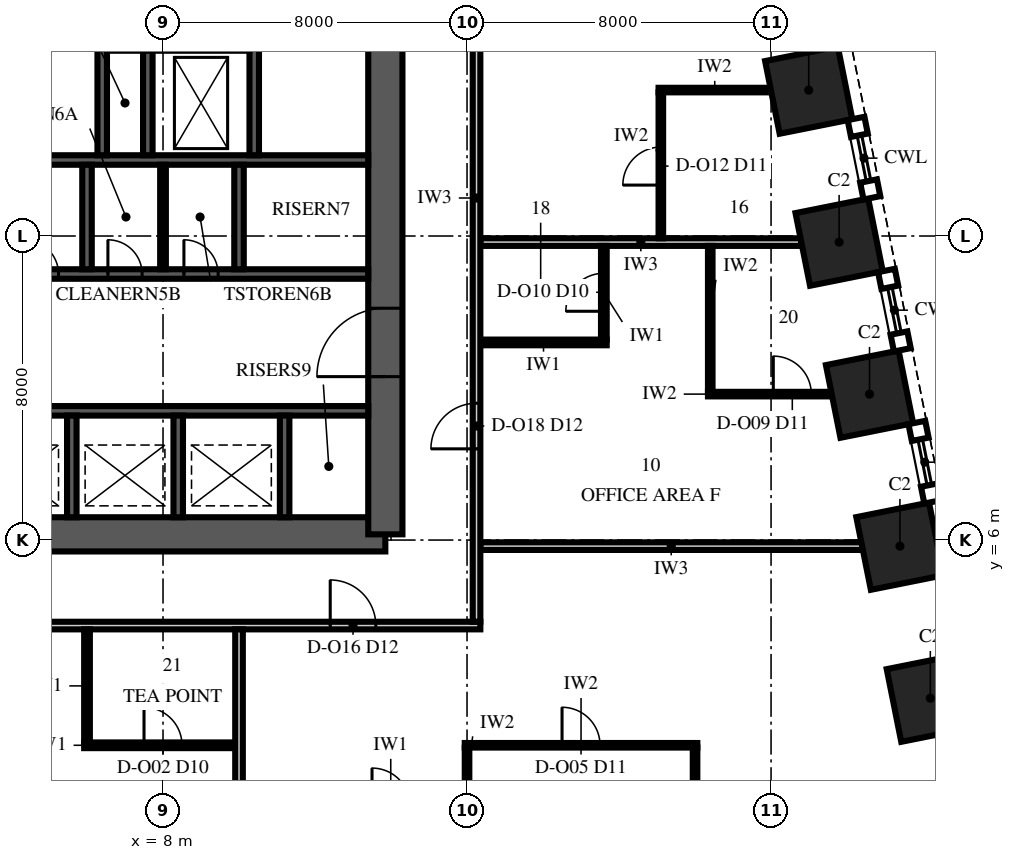
"""IFC4 building model, lengths in metres.
Left out: names, types, materials, properties, quantities, classifications, styles, units other than length and angle.
Written with IfcOpenShell. Run it as: python <this file> out.ifc"""

import sys

from ifc_helpers import new_model, si_unit, direction, frame, frame_2d, origin, origin_2d, place, context, subcontext, project, spatial, polyline, rectangle, outline, extrude, element, fill, save


model = new_model("IFC4")
c1 = context("Model", 3, precision=1e-05, world=origin(), true_north=direction((0.0, 1.0)))
c2 = subcontext(c1, "Body", "Model", "MODEL_VIEW")
j1 = project(units=[si_unit("LENGTHUNIT", "METRE"), si_unit("PLANEANGLEUNIT", "RADIAN")], contexts=[c1])
p1 = place(None, origin())
s1 = spatial("IfcSite", under=j1, at=p1, CompositionType="ELEMENT")
p2 = place(p1, origin())
s2 = spatial("IfcBuilding", under=s1, at=p2, CompositionType="ELEMENT")
p3 = place(p2, frame((0.0, 0.0, 36.0)))
s3 = spatial("IfcBuildingStorey", under=s2, at=p3, CompositionType="ELEMENT", Elevation=36.0)
for number, where, z_axis, x_axis in (
    (1, (28.191, 1.838, 0.0), (0.0, 0.0, 1.0), (-0.196, 0.981, 0.0)),
    (2, (27.391, 5.838, 0.0), (0.0, 0.0, 1.0), (-0.196, 0.981, 0.0)),
    (3, (26.591, 9.838, 0.0), (0.0, 0.0, 1.0), (-0.196, 0.981, 0.0)),
    (4, (25.791, 13.838, 0.0), (0.0, 0.0, 1.0), (-0.196, 0.981, 0.0)),
    (5, (24.991, 17.838, 0.0), (0.0, 0.0, 1.0), (-0.196, 0.981, 0.0)),
):
    element("IfcColumn", number, at=place(p3, frame(where, z_axis=z_axis, x_axis=x_axis)), inside=s3, PredefinedType="COLUMN", context=c2, shape_type="SweptSolid", body=[
        extrude(rectangle(XDim=1.95, YDim=1.95, at=origin_2d()), origin(), (0.0, 0.0, 1.0), 4.0),
    ])
p4 = place(p3, frame((-13.85, 6.15, 0.0), z_axis=(0.0, 0.0, 1.0), x_axis=(1.0, 0.0, 0.0)))
e6 = element("IfcWall", 6, at=p4, inside=s3, PredefinedType="SHEAR", context=c2, shape_type="SweptSolid", body=[
    extrude(rectangle(XDim=27.7, YDim=0.9, at=frame_2d((13.85, 0.0))), origin(), (0.0, 0.0, 1.0), 4.0),
])
p5 = place(p3, frame((13.85, 6.15, 0.0), z_axis=(0.0, 0.0, 1.0), x_axis=(0.0, 1.0, 0.0)))
e7 = element("IfcWall", 7, at=p5, inside=s3, PredefinedType="SHEAR", context=c2, shape_type="SweptSolid", body=[
    extrude(outline(polyline([(0.0, -0.45), (17.7, -0.45), (17.7, 0.0), (17.25, 0.0), (17.25, 0.45), (0.45, 0.45), (0.45, 0.0), (0.0, 0.0), (0.0, -0.45)])), origin(), (0.0, 0.0, 1.0), 4.0),
])
p6 = place(p5, frame((4.15, 0.0, 0.0)))
e8 = element("IfcOpeningElement", 8, at=p6, cuts=e7, PredefinedType="OPENING", context=c2, shape_type="SweptSolid", body=[
    extrude(rectangle(XDim=1.8, YDim=2.4, at=frame_2d((0.9, 1.2))), frame((0.0, 0.465, 0.0), z_axis=(0.0, -1.0, 0.0), x_axis=(1.0, 0.0, 0.0)), (0.0, 0.0, 1.0), 0.93),
])
p7 = place(p3, frame((-13.4, 9.4, 0.0), z_axis=(0.0, 0.0, 1.0), x_axis=(1.0, 0.0, 0.0)))
e9 = element("IfcWall", 9, at=p7, inside=s3, PredefinedType="SHEAR", context=c2, shape_type="SweptSolid", body=[
    extrude(rectangle(XDim=26.8, YDim=0.25, at=frame_2d((13.4, 0.0))), origin(), (0.0, 0.0, 1.0), 4.0),
])
p8 = place(p7, frame((0.25, 0.0, 0.0)))
e10 = element("IfcOpeningElement", 10, at=p8, cuts=e9, PredefinedType="OPENING", context=c2, shape_type="SweptSolid", body=[
    extrude(rectangle(XDim=1.1, YDim=2.1, at=frame_2d((0.55, 1.05))), frame((0.0, 0.14, 0.0), z_axis=(0.0, -1.0, 0.0), x_axis=(1.0, 0.0, 0.0)), (0.0, 0.0, 1.0), 0.28),
])
p9 = place(p7, frame((3.05, 0.0, 0.0)))
e11 = element("IfcOpeningElement", 11, at=p9, cuts=e9, PredefinedType="OPENING", context=c2, shape_type="SweptSolid", body=[
    extrude(rectangle(XDim=1.1, YDim=2.1, at=frame_2d((0.55, 1.05))), frame((0.0, 0.14, 0.0), z_axis=(0.0, -1.0, 0.0), x_axis=(1.0, 0.0, 0.0)), (0.0, 0.0, 1.0), 0.28),
])
p10 = place(p7, frame((5.85, 0.0, 0.0)))
e12 = element("IfcOpeningElement", 12, at=p10, cuts=e9, PredefinedType="OPENING", context=c2, shape_type="SweptSolid", body=[
    extrude(rectangle(XDim=1.1, YDim=2.1, at=frame_2d((0.55, 1.05))), frame((0.0, 0.14, 0.0), z_axis=(0.0, -1.0, 0.0), x_axis=(1.0, 0.0, 0.0)), (0.0, 0.0, 1.0), 0.28),
])
p11 = place(p3, frame((-13.4, 13.0, 0.0), z_axis=(0.0, 0.0, 1.0), x_axis=(1.0, 0.0, 0.0)))
e13 = element("IfcWall", 13, at=p11, inside=s3, PredefinedType="SHEAR", context=c2, shape_type="SweptSolid", body=[
    extrude(rectangle(XDim=26.8, YDim=0.25, at=frame_2d((13.4, 0.0))), origin(), (0.0, 0.0, 1.0), 4.0),
])
p12 = place(p11, frame((0.25, 0.0, 0.0)))
e14 = element("IfcOpeningElement", 14, at=p12, cuts=e13, PredefinedType="OPENING", context=c2, shape_type="SweptSolid", body=[
    extrude(rectangle(XDim=1.1, YDim=2.1, at=frame_2d((0.55, 1.05))), frame((0.0, 0.14, 0.0), z_axis=(0.0, -1.0, 0.0), x_axis=(1.0, 0.0, 0.0)), (0.0, 0.0, 1.0), 0.28),
])
p13 = place(p11, frame((8.65, 0.0, 0.0)))
e15 = element("IfcOpeningElement", 15, at=p13, cuts=e13, PredefinedType="OPENING", context=c2, shape_type="SweptSolid", body=[
    extrude(rectangle(XDim=1.1, YDim=2.1, at=frame_2d((0.55, 1.05))), frame((0.0, 0.14, 0.0), z_axis=(0.0, -1.0, 0.0), x_axis=(1.0, 0.0, 0.0)), (0.0, 0.0, 1.0), 0.28),
])
p14 = place(p11, frame((12.05, 0.0, 0.0)))
e16 = element("IfcOpeningElement", 16, at=p14, cuts=e13, PredefinedType="OPENING", context=c2, shape_type="SweptSolid", body=[
    extrude(rectangle(XDim=1.1, YDim=2.1, at=frame_2d((0.55, 1.05))), frame((0.0, 0.14, 0.0), z_axis=(0.0, -1.0, 0.0), x_axis=(1.0, 0.0, 0.0)), (0.0, 0.0, 1.0), 0.28),
])
p15 = place(p11, frame((15.35, 0.0, 0.0)))
e17 = element("IfcOpeningElement", 17, at=p15, cuts=e13, PredefinedType="OPENING", context=c2, shape_type="SweptSolid", body=[
    extrude(rectangle(XDim=0.9, YDim=2.1, at=frame_2d((0.45, 1.05))), frame((0.0, 0.14, 0.0), z_axis=(0.0, -1.0, 0.0), x_axis=(1.0, 0.0, 0.0)), (0.0, 0.0, 1.0), 0.28),
])
p16 = place(p11, frame((17.75, 0.0, 0.0)))
e18 = element("IfcOpeningElement", 18, at=p16, cuts=e13, PredefinedType="OPENING", context=c2, shape_type="SweptSolid", body=[
    extrude(rectangle(XDim=0.9, YDim=2.1, at=frame_2d((0.45, 1.05))), frame((0.0, 0.14, 0.0), z_axis=(0.0, -1.0, 0.0), x_axis=(1.0, 0.0, 0.0)), (0.0, 0.0, 1.0), 0.28),
])
p17 = place(p11, frame((19.95, 0.0, 0.0)))
e19 = element("IfcOpeningElement", 19, at=p17, cuts=e13, PredefinedType="OPENING", context=c2, shape_type="SweptSolid", body=[
    extrude(rectangle(XDim=0.9, YDim=2.1, at=frame_2d((0.45, 1.05))), frame((0.0, 0.14, 0.0), z_axis=(0.0, -1.0, 0.0), x_axis=(1.0, 0.0, 0.0)), (0.0, 0.0, 1.0), 0.28),
])
p18 = place(p11, frame((21.95, 0.0, 0.0)))
e20 = element("IfcOpeningElement", 20, at=p18, cuts=e13, PredefinedType="OPENING", context=c2, shape_type="SweptSolid", body=[
    extrude(rectangle(XDim=0.9, YDim=2.1, at=frame_2d((0.45, 1.05))), frame((0.0, 0.14, 0.0), z_axis=(0.0, -1.0, 0.0), x_axis=(1.0, 0.0, 0.0)), (0.0, 0.0, 1.0), 0.28),
])
p19 = place(p3, frame((-13.4, 16.0, 0.0), z_axis=(0.0, 0.0, 1.0), x_axis=(1.0, 0.0, 0.0)))
e21 = element("IfcWall", 21, at=p19, inside=s3, PredefinedType="SHEAR", context=c2, shape_type="SweptSolid", body=[
    extrude(rectangle(XDim=26.8, YDim=0.25, at=frame_2d((13.4, 0.0))), origin(), (0.0, 0.0, 1.0), 4.0),
])
for number, where, z_axis, x_axis in (
    (22, (5.6, 6.6, 0.0), (0.0, 0.0, 1.0), (0.0, 1.0, 0.0)),
    (23, (8.4, 6.6, 0.0), (0.0, 0.0, 1.0), (0.0, 1.0, 0.0)),
    (24, (11.2, 6.6, 0.0), (0.0, 0.0, 1.0), (0.0, 1.0, 0.0)),
):
    element("IfcWall", number, at=place(p3, frame(where, z_axis=z_axis, x_axis=x_axis)), inside=s3, PredefinedType="SHEAR", context=c2, shape_type="SweptSolid", body=[
        extrude(rectangle(XDim=2.675, YDim=0.25, at=frame_2d((1.337, 0.0))), origin(), (0.0, 0.0, 1.0), 4.0),
    ])
for number, where, z_axis, x_axis in (
    (25, (6.0, 13.125, 0.0), (0.0, 0.0, 1.0), (0.0, 1.0, 0.0)),
    (26, (10.0, 13.125, 0.0), (0.0, 0.0, 1.0), (0.0, 1.0, 0.0)),
):
    element("IfcWall", number, at=place(p3, frame(where, z_axis=z_axis, x_axis=x_axis)), inside=s3, PredefinedType="SHEAR", context=c2, shape_type="SweptSolid", body=[
        extrude(rectangle(XDim=2.75, YDim=0.25, at=frame_2d((1.375, 0.0))), origin(), (0.0, 0.0, 1.0), 4.0),
    ])
p20 = place(p3, frame((6.4, 16.125, 0.0), z_axis=(0.0, 0.0, 1.0), x_axis=(0.0, 1.0, 0.0)))
e27 = element("IfcWall", 27, at=p20, inside=s3, PredefinedType="SHEAR", context=c2, shape_type="SweptSolid", body=[
    extrude(rectangle(XDim=7.275, YDim=0.25, at=frame_2d((3.637, 0.0))), origin(), (0.0, 0.0, 1.0), 4.0),
])
p21 = place(p3, frame((10.4, 16.125, 0.0), z_axis=(0.0, 0.0, 1.0), x_axis=(0.0, 1.0, 0.0)))
e28 = element("IfcWall", 28, at=p21, inside=s3, PredefinedType="SHEAR", context=c2, shape_type="SweptSolid", body=[
    extrude(rectangle(XDim=7.275, YDim=0.25, at=frame_2d((3.637, 0.0))), origin(), (0.0, 0.0, 1.0), 4.0),
])
p22 = place(p21, frame((6.075, 0.0, 0.0)))
e29 = element("IfcOpeningElement", 29, at=p22, cuts=e28, PredefinedType="OPENING", context=c2, shape_type="SweptSolid", body=[
    extrude(rectangle(XDim=1.0, YDim=2.1, at=frame_2d((0.5, 1.05))), frame((0.0, 0.14, 0.0), z_axis=(0.0, -1.0, 0.0), x_axis=(1.0, 0.0, 0.0)), (0.0, 0.0, 1.0), 0.28),
])
p23 = place(p3, frame((7.6, 16.125, 0.0), z_axis=(0.0, 0.0, 1.0), x_axis=(0.0, 1.0, 0.0)))
e30 = element("IfcWall", 30, at=p23, inside=s3, PredefinedType="SHEAR", context=c2, shape_type="SweptSolid", body=[
    extrude(rectangle(XDim=2.75, YDim=0.25, at=frame_2d((1.375, 0.0))), origin(), (0.0, 0.0, 1.0), 4.0),
])
p24 = place(p3, frame((8.0, 13.125, 0.0), z_axis=(0.0, 0.0, 1.0), x_axis=(0.0, 1.0, 0.0)))
e31 = element("IfcWall", 31, at=p24, inside=s3, PredefinedType="PARTITIONING", context=c2, shape_type="SweptSolid", body=[
    extrude(rectangle(XDim=2.75, YDim=0.15, at=frame_2d((1.375, 0.0))), origin(), (0.0, 0.0, 1.0), 3.85),
])
p25 = place(p3, frame((5.925, 0.6, 0.0), z_axis=(0.0, 0.0, 1.0), x_axis=(1.0, 0.0, 0.0)))
e32 = element("IfcWall", 32, at=p25, inside=s3, PredefinedType="PARTITIONING", context=c2, shape_type="SweptSolid", body=[
    extrude(rectangle(XDim=3.975, YDim=0.15, at=frame_2d((1.987, 0.0))), origin(), (0.0, 0.0, 1.0), 3.85),
])
p26 = place(p25, frame((1.575, 0.0, 0.0)))
e33 = element("IfcOpeningElement", 33, at=p26, cuts=e32, PredefinedType="OPENING", context=c2, shape_type="SweptSolid", body=[
    extrude(rectangle(XDim=1.0, YDim=2.3, at=frame_2d((0.5, 1.15))), frame((0.0, 0.09, 0.0), z_axis=(0.0, -1.0, 0.0), x_axis=(1.0, 0.0, 0.0)), (0.0, 0.0, 1.0), 0.18),
])
p27 = place(p3, frame((15.94, 0.6, 0.0), z_axis=(0.0, 0.0, 1.0), x_axis=(1.0, 0.0, 0.0)))
e34 = element("IfcWall", 34, at=p27, inside=s3, PredefinedType="PARTITIONING", context=c2, shape_type="SweptSolid", body=[
    extrude(rectangle(XDim=6.12, YDim=0.12, at=frame_2d((3.06, 0.0))), origin(), (0.0, 0.0, 1.0), 3.25),
])
p28 = place(p27, frame((2.56, 0.0, 0.0)))
e35 = element("IfcOpeningElement", 35, at=p28, cuts=e34, PredefinedType="OPENING", context=c2, shape_type="SweptSolid", body=[
    extrude(rectangle(XDim=1.0, YDim=2.4, at=frame_2d((0.5, 1.2))), frame((0.0, 0.075, 0.0), z_axis=(0.0, -1.0, 0.0), x_axis=(1.0, 0.0, 0.0)), (0.0, 0.0, 1.0), 0.15),
])
p29 = place(p3, frame((-16.35, 3.75, 0.0), z_axis=(0.0, 0.0, 1.0), x_axis=(1.0, 0.0, 0.0)))
e36 = element("IfcWall", 36, at=p29, inside=s3, PredefinedType="PARTITIONING", context=c2, shape_type="SweptSolid", body=[
    extrude(rectangle(XDim=32.7, YDim=0.2, at=frame_2d((16.35, 0.0))), origin(), (0.0, 0.0, 1.0), 3.25),
])
p30 = place(p29, frame((15.75, 0.0, 0.0)))
e37 = element("IfcOpeningElement", 37, at=p30, cuts=e36, PredefinedType="OPENING", context=c2, shape_type="SweptSolid", body=[
    extrude(rectangle(XDim=1.2, YDim=2.4, at=frame_2d((0.6, 1.2))), frame((0.0, 0.115, 0.0), z_axis=(0.0, -1.0, 0.0), x_axis=(1.0, 0.0, 0.0)), (0.0, 0.0, 1.0), 0.23),
])
p31 = place(p29, frame((2.75, 0.0, 0.0)))
e38 = element("IfcOpeningElement", 38, at=p31, cuts=e36, PredefinedType="OPENING", context=c2, shape_type="SweptSolid", body=[
    extrude(rectangle(XDim=1.2, YDim=2.4, at=frame_2d((0.6, 1.2))), frame((0.0, 0.115, 0.0), z_axis=(0.0, -1.0, 0.0), x_axis=(1.0, 0.0, 0.0)), (0.0, 0.0, 1.0), 0.23),
])
p32 = place(p29, frame((28.75, 0.0, 0.0)))
e39 = element("IfcOpeningElement", 39, at=p32, cuts=e36, PredefinedType="OPENING", context=c2, shape_type="SweptSolid", body=[
    extrude(rectangle(XDim=1.2, YDim=2.4, at=frame_2d((0.6, 1.2))), frame((0.0, 0.115, 0.0), z_axis=(0.0, -1.0, 0.0), x_axis=(1.0, 0.0, 0.0)), (0.0, 0.0, 1.0), 0.23),
])
p33 = place(p3, frame((16.35, 5.84, 0.0), z_axis=(0.0, 0.0, 1.0), x_axis=(1.0, 0.0, 0.0)))
e40 = element("IfcWall", 40, at=p33, inside=s3, PredefinedType="PARTITIONING", context=c2, shape_type="SweptSolid", body=[
    extrude(rectangle(XDim=10.046, YDim=0.2, at=frame_2d((5.023, 0.0))), origin(), (0.0, 0.0, 1.0), 2.842),
])
p34 = place(p3, frame((22.34, 9.84, 0.0), z_axis=(0.0, 0.0, 1.0), x_axis=(1.0, 0.0, 0.0)))
e41 = element("IfcWall", 41, at=p34, inside=s3, PredefinedType="PARTITIONING", context=c2, shape_type="SweptSolid", body=[
    extrude(rectangle(XDim=3.256, YDim=0.12, at=frame_2d((1.628, 0.0))), origin(), (0.0, 0.0, 1.0), 3.25),
])
p35 = place(p34, frame((1.719, 0.0, 0.0)))
e42 = element("IfcOpeningElement", 42, at=p35, cuts=e41, PredefinedType="OPENING", context=c2, shape_type="SweptSolid", body=[
    extrude(rectangle(XDim=1.0, YDim=2.4, at=frame_2d((0.5, 1.2))), frame((0.0, 0.075, 0.0), z_axis=(0.0, -1.0, 0.0), x_axis=(1.0, 0.0, 0.0)), (0.0, 0.0, 1.0), 0.15),
])
p36 = place(p3, frame((16.35, 11.2, 0.0), z_axis=(0.0, 0.0, 1.0), x_axis=(1.0, 0.0, 0.0)))
e43 = element("IfcWall", 43, at=p36, inside=s3, PredefinedType="PARTITIONING", context=c2, shape_type="SweptSolid", body=[
    extrude(rectangle(XDim=3.325, YDim=0.15, at=frame_2d((1.663, 0.0))), origin(), (0.0, 0.0, 1.0), 3.85),
])
p37 = place(p3, frame((16.35, 13.84, 0.0), z_axis=(0.0, 0.0, 1.0), x_axis=(1.0, 0.0, 0.0)))
e44 = element("IfcWall", 44, at=p37, inside=s3, PredefinedType="PARTITIONING", context=c2, shape_type="SweptSolid", body=[
    extrude(rectangle(XDim=8.446, YDim=0.2, at=frame_2d((4.223, 0.0))), origin(), (0.0, 0.0, 1.0), 3.25),
])
p38 = place(p3, frame((21.04, 17.84, 0.0), z_axis=(0.0, 0.0, 1.0), x_axis=(1.0, 0.0, 0.0)))
e45 = element("IfcWall", 45, at=p38, inside=s3, PredefinedType="PARTITIONING", context=c2, shape_type="SweptSolid", body=[
    extrude(rectangle(XDim=2.956, YDim=0.12, at=frame_2d((1.478, 0.0))), origin(), (0.0, 0.0, 1.0), 3.25),
])
p39 = place(p3, frame((6.0, 0.675, 0.0), z_axis=(0.0, 0.0, 1.0), x_axis=(0.0, 1.0, 0.0)))
e46 = element("IfcWall", 46, at=p39, inside=s3, PredefinedType="PARTITIONING", context=c2, shape_type="SweptSolid", body=[
    extrude(rectangle(XDim=2.975, YDim=0.15, at=frame_2d((1.487, 0.0))), origin(), (0.0, 0.0, 1.0), 3.85),
])
p40 = place(p3, frame((10.0, -15.925, 0.0), z_axis=(0.0, 0.0, 1.0), x_axis=(0.0, 1.0, 0.0)))
e47 = element("IfcWall", 47, at=p40, inside=s3, PredefinedType="PARTITIONING", context=c2, shape_type="SweptSolid", body=[
    extrude(rectangle(XDim=19.575, YDim=0.2, at=frame_2d((9.788, 0.0))), origin(), (0.0, 0.0, 1.0), 2.842),
])
p41 = place(p3, frame((16.0, -0.925, 0.0), z_axis=(0.0, 0.0, 1.0), x_axis=(0.0, 1.0, 0.0)))
e48 = element("IfcWall", 48, at=p41, inside=s3, PredefinedType="PARTITIONING", context=c2, shape_type="SweptSolid", body=[
    extrude(rectangle(XDim=1.465, YDim=0.12, at=frame_2d((0.732, 0.0))), origin(), (0.0, 0.0, 1.0), 3.85),
])
p42 = place(p3, frame((16.25, 3.85, 0.0), z_axis=(0.0, 0.0, 1.0), x_axis=(0.0, 1.0, 0.0)))
e49 = element("IfcWall", 49, at=p42, inside=s3, PredefinedType="PARTITIONING", context=c2, shape_type="SweptSolid", body=[
    extrude(rectangle(XDim=22.3, YDim=0.2, at=frame_2d((11.15, 0.0))), origin(), (0.0, 0.0, 1.0), 2.842),
])
p43 = place(p42, frame((4.55, 0.0, 0.0)))
e50 = element("IfcOpeningElement", 50, at=p43, cuts=e49, PredefinedType="OPENING", context=c2, shape_type="SweptSolid", body=[
    extrude(rectangle(XDim=1.2, YDim=2.4, at=frame_2d((0.6, 1.2))), frame((0.0, 0.115, 0.0), z_axis=(0.0, -1.0, 0.0), x_axis=(1.0, 0.0, 0.0)), (0.0, 0.0, 1.0), 0.23),
])
p44 = place(p3, frame((19.6, 11.275, 0.0), z_axis=(0.0, 0.0, 1.0), x_axis=(0.0, 1.0, 0.0)))
e51 = element("IfcWall", 51, at=p44, inside=s3, PredefinedType="PARTITIONING", context=c2, shape_type="SweptSolid", body=[
    extrude(rectangle(XDim=2.465, YDim=0.15, at=frame_2d((1.232, 0.0))), origin(), (0.0, 0.0, 1.0), 3.85),
])
p45 = place(p44, frame((0.745, 0.0, 0.0)))
e52 = element("IfcOpeningElement", 52, at=p45, cuts=e51, PredefinedType="OPENING", context=c2, shape_type="SweptSolid", body=[
    extrude(rectangle(XDim=1.0, YDim=2.3, at=frame_2d((0.5, 1.15))), frame((0.0, 0.09, 0.0), z_axis=(0.0, -1.0, 0.0), x_axis=(1.0, 0.0, 0.0)), (0.0, 0.0, 1.0), 0.18),
])
p46 = place(p3, frame((21.1, 13.94, 0.0), z_axis=(0.0, 0.0, 1.0), x_axis=(0.0, 1.0, 0.0)))
e53 = element("IfcWall", 53, at=p46, inside=s3, PredefinedType="PARTITIONING", context=c2, shape_type="SweptSolid", body=[
    extrude(rectangle(XDim=3.84, YDim=0.12, at=frame_2d((1.92, 0.0))), origin(), (0.0, 0.0, 1.0), 3.25),
])
p47 = place(p46, frame((1.4, 0.0, 0.0)))
e54 = element("IfcOpeningElement", 54, at=p47, cuts=e53, PredefinedType="OPENING", context=c2, shape_type="SweptSolid", body=[
    extrude(rectangle(XDim=1.0, YDim=2.4, at=frame_2d((0.5, 1.2))), frame((0.0, 0.075, 0.0), z_axis=(0.0, -1.0, 0.0), x_axis=(1.0, 0.0, 0.0)), (0.0, 0.0, 1.0), 0.15),
])
p48 = place(p3, frame((22.0, -4.74, 0.0), z_axis=(0.0, 0.0, 1.0), x_axis=(0.0, 1.0, 0.0)))
e55 = element("IfcWall", 55, at=p48, inside=s3, PredefinedType="PARTITIONING", context=c2, shape_type="SweptSolid", body=[
    extrude(rectangle(XDim=5.28, YDim=0.12, at=frame_2d((2.64, 0.0))), origin(), (0.0, 0.0, 1.0), 3.25),
])
p49 = place(p3, frame((22.4, 9.9, 0.0), z_axis=(0.0, 0.0, 1.0), x_axis=(0.0, 1.0, 0.0)))
e56 = element("IfcWall", 56, at=p49, inside=s3, PredefinedType="PARTITIONING", context=c2, shape_type="SweptSolid", body=[
    extrude(rectangle(XDim=3.84, YDim=0.12, at=frame_2d((1.92, 0.0))), origin(), (0.0, 0.0, 1.0), 3.85),
])
p50 = place(p6, origin())
e57 = element("IfcDoor", 57, at=p50, inside=s3, OperationType="DOUBLE_DOOR_SINGLE_SWING", PredefinedType="DOOR", context=c2, shape_type="SweptSolid", body=[
    extrude(rectangle(XDim=1.8, YDim=2.4, at=frame_2d((0.9, 1.2))), frame((0.0, 0.45, 0.0), z_axis=(0.0, -1.0, 0.0), x_axis=(1.0, 0.0, 0.0)), (0.0, 0.0, 1.0), 0.899),
])
fill(e8, e57)
p51 = place(p16, origin())
e58 = element("IfcDoor", 58, at=p51, inside=s3, OperationType="SINGLE_SWING_LEFT", PredefinedType="DOOR", context=c2, shape_type="SweptSolid", body=[
    extrude(rectangle(XDim=0.9, YDim=2.1, at=frame_2d((0.45, 1.05))), frame((0.0, 0.125, 0.0), z_axis=(0.0, -1.0, 0.0), x_axis=(1.0, 0.0, 0.0)), (0.0, 0.0, 1.0), 0.25),
])
fill(e18, e58)
p52 = place(p17, origin())
e59 = element("IfcDoor", 59, at=p52, inside=s3, OperationType="SINGLE_SWING_LEFT", PredefinedType="DOOR", context=c2, shape_type="SweptSolid", body=[
    extrude(rectangle(XDim=0.9, YDim=2.1, at=frame_2d((0.45, 1.05))), frame((0.0, 0.125, 0.0), z_axis=(0.0, -1.0, 0.0), x_axis=(1.0, 0.0, 0.0)), (0.0, 0.0, 1.0), 0.25),
])
fill(e19, e59)
p53 = place(p18, origin())
e60 = element("IfcDoor", 60, at=p53, inside=s3, OperationType="SINGLE_SWING_LEFT", PredefinedType="DOOR", context=c2, shape_type="SweptSolid", body=[
    extrude(rectangle(XDim=0.9, YDim=2.1, at=frame_2d((0.45, 1.05))), frame((0.0, 0.125, 0.0), z_axis=(0.0, -1.0, 0.0), x_axis=(1.0, 0.0, 0.0)), (0.0, 0.0, 1.0), 0.25),
])
fill(e20, e60)
p54 = place(p26, origin())
e61 = element("IfcDoor", 61, at=p54, inside=s3, OperationType="SINGLE_SWING_LEFT", PredefinedType="DOOR", context=c2, shape_type="SweptSolid", body=[
    extrude(rectangle(XDim=1.0, YDim=2.3, at=frame_2d((0.5, 1.15))), frame((0.0, 0.075, 0.0), z_axis=(0.0, -1.0, 0.0), x_axis=(1.0, 0.0, 0.0)), (0.0, 0.0, 1.0), 0.149),
])
fill(e33, e61)
p55 = place(p28, origin())
e62 = element("IfcDoor", 62, at=p55, inside=s3, OperationType="SINGLE_SWING_RIGHT", PredefinedType="DOOR", context=c2, shape_type="SweptSolid", body=[
    extrude(rectangle(XDim=1.0, YDim=2.4, at=frame_2d((0.5, 1.2))), frame((0.0, 0.06, 0.0), z_axis=(0.0, -1.0, 0.0), x_axis=(1.0, 0.0, 0.0)), (0.0, 0.0, 1.0), 0.12),
])
fill(e35, e62)
p56 = place(p35, origin())
e63 = element("IfcDoor", 63, at=p56, inside=s3, OperationType="SINGLE_SWING_RIGHT", PredefinedType="DOOR", context=c2, shape_type="SweptSolid", body=[
    extrude(rectangle(XDim=1.0, YDim=2.4, at=frame_2d((0.5, 1.2))), frame((0.0, 0.06, 0.0), z_axis=(0.0, -1.0, 0.0), x_axis=(1.0, 0.0, 0.0)), (0.0, 0.0, 1.0), 0.12),
])
fill(e42, e63)
p57 = place(p45, origin())
e64 = element("IfcDoor", 64, at=p57, inside=s3, OperationType="SINGLE_SWING_LEFT", PredefinedType="DOOR", context=c2, shape_type="SweptSolid", body=[
    extrude(rectangle(XDim=1.0, YDim=2.3, at=frame_2d((0.5, 1.15))), frame((0.0, 0.075, 0.0), z_axis=(0.0, -1.0, 0.0), x_axis=(1.0, 0.0, 0.0)), (0.0, 0.0, 1.0), 0.149),
])
fill(e52, e64)
p58 = place(p47, origin())
e65 = element("IfcDoor", 65, at=p58, inside=s3, OperationType="SINGLE_SWING_RIGHT", PredefinedType="DOOR", context=c2, shape_type="SweptSolid", body=[
    extrude(rectangle(XDim=1.0, YDim=2.4, at=frame_2d((0.5, 1.2))), frame((0.0, 0.06, 0.0), z_axis=(0.0, -1.0, 0.0), x_axis=(1.0, 0.0, 0.0)), (0.0, 0.0, 1.0), 0.12),
])
fill(e54, e65)
p59 = place(p32, origin())
e66 = element("IfcDoor", 66, at=p59, inside=s3, OperationType="SINGLE_SWING_LEFT", PredefinedType="DOOR", context=c2, shape_type="SweptSolid", body=[
    extrude(rectangle(XDim=1.2, YDim=2.4, at=frame_2d((0.6, 1.2))), frame((0.0, 0.1, 0.0), z_axis=(0.0, -1.0, 0.0), x_axis=(1.0, 0.0, 0.0)), (0.0, 0.0, 1.0), 0.199),
])
fill(e39, e66)
p60 = place(p43, origin())
e67 = element("IfcDoor", 67, at=p60, inside=s3, OperationType="SINGLE_SWING_LEFT", PredefinedType="DOOR", context=c2, shape_type="SweptSolid", body=[
    extrude(rectangle(XDim=1.2, YDim=2.4, at=frame_2d((0.6, 1.2))), frame((0.0, 0.1, 0.0), z_axis=(0.0, -1.0, 0.0), x_axis=(1.0, 0.0, 0.0)), (0.0, 0.0, 1.0), 0.199),
])
fill(e50, e67)
save(model, sys.argv[1])
